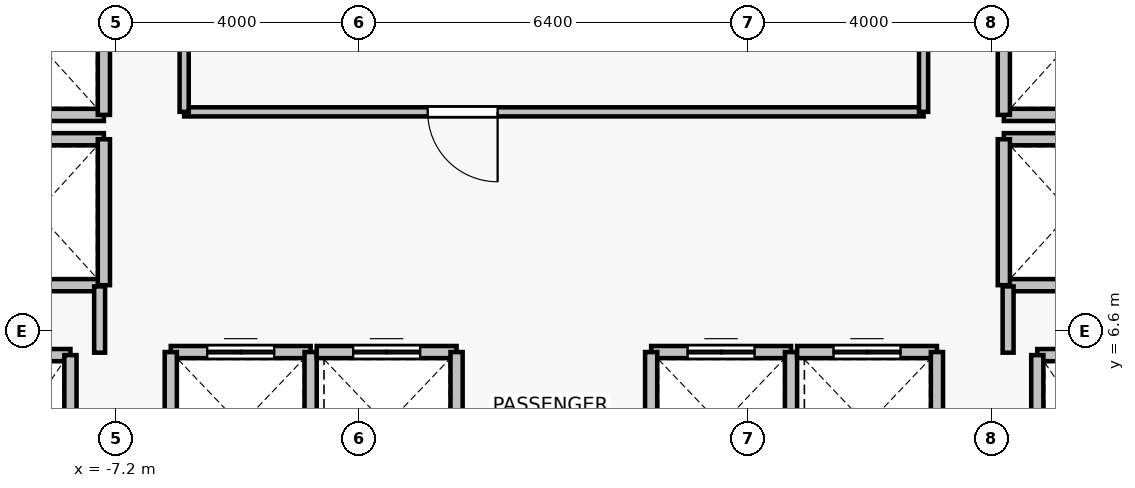
"""IFC4 building model, lengths in metres.
Left out: names, types, materials, properties, quantities, classifications, styles, units other than length and angle.
Written with IfcOpenShell. Run it as: python <this file> out.ifc"""

import sys

from ifc_helpers import new_model, si_unit, direction, frame, frame_2d, origin, place, context, subcontext, project, spatial, rectangle, extrude, source, transform, mapped, element, fill, save


model = new_model("IFC4")
c1 = context("Model", 3, precision=1e-05, world=origin(), true_north=direction((0.0, 1.0)))
c2 = subcontext(c1, "Body", "Model", "MODEL_VIEW")
j1 = project(units=[si_unit("LENGTHUNIT", "METRE"), si_unit("PLANEANGLEUNIT", "RADIAN")], contexts=[c1])
p1 = place(None, origin())
s1 = spatial("IfcSite", under=j1, at=p1, CompositionType="ELEMENT")
p2 = place(p1, origin())
s2 = spatial("IfcBuilding", under=s1, at=p2, CompositionType="ELEMENT")
p3 = place(p2, frame((0.0, 0.0, 106.6)))
s3 = spatial("IfcBuildingStorey", under=s2, at=p3, CompositionType="ELEMENT", Elevation=106.6)
p4 = place(p3, frame((-9.95, 6.2, 0.0), z_axis=(0.0, 0.0, 1.0), x_axis=(1.0, 0.0, 0.0)))
e1 = element("IfcWall", 1, at=p4, inside=s3, PredefinedType="SOLIDWALL", context=c2, shape_type="SweptSolid", body=[
    extrude(rectangle(XDim=2.0, YDim=0.2, at=frame_2d((1.0, 0.0))), origin(), (0.0, 0.0, 1.0), 3.075),
])
p5 = place(p3, frame((-7.95, 6.2, 0.0), z_axis=(0.0, 0.0, 1.0), x_axis=(0.0, -1.0, 0.0)))
e2 = element("IfcWall", 2, at=p5, inside=s3, PredefinedType="SOLIDWALL", context=c2, shape_type="SweptSolid", body=[
    extrude(rectangle(XDim=2.8, YDim=0.2, at=frame_2d((1.4, 0.0))), origin(), (0.0, 0.0, 1.0), 3.075),
])
p6 = place(p3, frame((7.95, 6.2, 0.0), z_axis=(0.0, 0.0, 1.0), x_axis=(1.0, 0.0, 0.0)))
e3 = element("IfcWall", 3, at=p6, inside=s3, PredefinedType="SOLIDWALL", context=c2, shape_type="SweptSolid", body=[
    extrude(rectangle(XDim=2.0, YDim=0.2, at=frame_2d((1.0, 0.0))), origin(), (0.0, 0.0, 1.0), 3.075),
])
p7 = place(p3, frame((7.95, 3.4, 0.0), z_axis=(0.0, 0.0, 1.0), x_axis=(0.0, 1.0, 0.0)))
e4 = element("IfcWall", 4, at=p7, inside=s3, PredefinedType="SOLIDWALL", context=c2, shape_type="SweptSolid", body=[
    extrude(rectangle(XDim=2.8, YDim=0.2, at=frame_2d((1.4, 0.0))), origin(), (0.0, 0.0, 1.0), 3.075),
])
p8 = place(p3, frame((-6.3, 6.25, 0.0), z_axis=(0.0, 0.0, 1.0), x_axis=(1.0, 0.0, 0.0)))
e5 = element("IfcWall", 5, at=p8, inside=s3, PredefinedType="SOLIDWALL", context=c2, shape_type="SweptSolid", body=[
    extrude(rectangle(XDim=2.3, YDim=0.2, at=frame_2d((1.15, 0.0))), origin(), (0.0, 0.0, 1.0), 3.075),
])
p9 = place(p8, frame((0.6, 0.0, 0.0)))
e6 = element("IfcOpeningElement", 6, at=p9, cuts=e5, PredefinedType="OPENING", context=c2, shape_type="SweptSolid", body=[
    extrude(rectangle(XDim=1.1, YDim=2.2, at=frame_2d((0.55, 1.1))), frame((0.0, 0.11, 0.0), z_axis=(0.0, -1.0, 0.0), x_axis=(1.0, 0.0, 0.0)), (0.0, 0.0, 1.0), 0.22),
])
for number, where, z_axis, x_axis in (
    (7, (-6.3, 3.85, 0.0), (0.0, 0.0, 1.0), (0.0, 1.0, 0.0)),
    (8, (-4.0, 6.25, 0.0), (0.0, 0.0, 1.0), (0.0, -1.0, 0.0)),
):
    element("IfcWall", number, at=place(p3, frame(where, z_axis=z_axis, x_axis=x_axis)), inside=s3, PredefinedType="SOLIDWALL", context=c2, shape_type="SweptSolid", body=[
        extrude(rectangle(XDim=2.4, YDim=0.2, at=frame_2d((1.2, 0.0))), origin(), (0.0, 0.0, 1.0), 3.075),
    ])
p10 = place(p3, frame((-3.9, 6.25, 0.0), z_axis=(0.0, 0.0, 1.0), x_axis=(1.0, 0.0, 0.0)))
e9 = element("IfcWall", 9, at=p10, inside=s3, PredefinedType="SOLIDWALL", context=c2, shape_type="SweptSolid", body=[
    extrude(rectangle(XDim=2.3, YDim=0.2, at=frame_2d((1.15, 0.0))), origin(), (0.0, 0.0, 1.0), 3.075),
])
p11 = place(p10, frame((0.6, 0.0, 0.0)))
e10 = element("IfcOpeningElement", 10, at=p11, cuts=e9, PredefinedType="OPENING", context=c2, shape_type="SweptSolid", body=[
    extrude(rectangle(XDim=1.1, YDim=2.2, at=frame_2d((0.55, 1.1))), frame((0.0, 0.11, 0.0), z_axis=(0.0, -1.0, 0.0), x_axis=(1.0, 0.0, 0.0)), (0.0, 0.0, 1.0), 0.22),
])
p12 = place(p3, frame((-1.6, 6.25, 0.0), z_axis=(0.0, 0.0, 1.0), x_axis=(0.0, -1.0, 0.0)))
e11 = element("IfcWall", 11, at=p12, inside=s3, PredefinedType="SOLIDWALL", context=c2, shape_type="SweptSolid", body=[
    extrude(rectangle(XDim=2.4, YDim=0.2, at=frame_2d((1.2, 0.0))), origin(), (0.0, 0.0, 1.0), 3.075),
])
p13 = place(p3, frame((1.6, 6.25, 0.0), z_axis=(0.0, 0.0, 1.0), x_axis=(1.0, 0.0, 0.0)))
e12 = element("IfcWall", 12, at=p13, inside=s3, PredefinedType="SOLIDWALL", context=c2, shape_type="SweptSolid", body=[
    extrude(rectangle(XDim=2.3, YDim=0.2, at=frame_2d((1.15, 0.0))), origin(), (0.0, 0.0, 1.0), 3.075),
])
p14 = place(p13, frame((0.6, 0.0, 0.0)))
e13 = element("IfcOpeningElement", 13, at=p14, cuts=e12, PredefinedType="OPENING", context=c2, shape_type="SweptSolid", body=[
    extrude(rectangle(XDim=1.1, YDim=2.2, at=frame_2d((0.55, 1.1))), frame((0.0, 0.11, 0.0), z_axis=(0.0, -1.0, 0.0), x_axis=(1.0, 0.0, 0.0)), (0.0, 0.0, 1.0), 0.22),
])
for number, where, z_axis, x_axis in (
    (14, (1.6, 3.85, 0.0), (0.0, 0.0, 1.0), (0.0, 1.0, 0.0)),
    (15, (3.9, 6.25, 0.0), (0.0, 0.0, 1.0), (0.0, -1.0, 0.0)),
):
    element("IfcWall", number, at=place(p3, frame(where, z_axis=z_axis, x_axis=x_axis)), inside=s3, PredefinedType="SOLIDWALL", context=c2, shape_type="SweptSolid", body=[
        extrude(rectangle(XDim=2.4, YDim=0.2, at=frame_2d((1.2, 0.0))), origin(), (0.0, 0.0, 1.0), 3.075),
    ])
p15 = place(p3, frame((4.0, 6.25, 0.0), z_axis=(0.0, 0.0, 1.0), x_axis=(1.0, 0.0, 0.0)))
e16 = element("IfcWall", 16, at=p15, inside=s3, PredefinedType="SOLIDWALL", context=c2, shape_type="SweptSolid", body=[
    extrude(rectangle(XDim=2.3, YDim=0.2, at=frame_2d((1.15, 0.0))), origin(), (0.0, 0.0, 1.0), 3.075),
])
p16 = place(p15, frame((0.6, 0.0, 0.0)))
e17 = element("IfcOpeningElement", 17, at=p16, cuts=e16, PredefinedType="OPENING", context=c2, shape_type="SweptSolid", body=[
    extrude(rectangle(XDim=1.1, YDim=2.2, at=frame_2d((0.55, 1.1))), frame((0.0, 0.11, 0.0), z_axis=(0.0, -1.0, 0.0), x_axis=(1.0, 0.0, 0.0)), (0.0, 0.0, 1.0), 0.22),
])
p17 = place(p3, frame((6.3, 6.25, 0.0), z_axis=(0.0, 0.0, 1.0), x_axis=(0.0, -1.0, 0.0)))
e18 = element("IfcWall", 18, at=p17, inside=s3, PredefinedType="SOLIDWALL", context=c2, shape_type="SweptSolid", body=[
    extrude(rectangle(XDim=2.4, YDim=0.2, at=frame_2d((1.2, 0.0))), origin(), (0.0, 0.0, 1.0), 3.075),
])
for number, where, z_axis, x_axis in (
    (19, (-7.4, 7.35, 0.0), (0.0, 0.0, 1.0), (-1.0, 0.0, 0.0)),
    (20, (-9.6, 9.75, 0.0), (0.0, 0.0, 1.0), (1.0, 0.0, 0.0)),
):
    element("IfcWall", number, at=place(p3, frame(where, z_axis=z_axis, x_axis=x_axis)), inside=s3, PredefinedType="SOLIDWALL", context=c2, shape_type="SweptSolid", body=[
        extrude(rectangle(XDim=2.2, YDim=0.2, at=frame_2d((1.1, 0.0))), origin(), (0.0, 0.0, 1.0), 2.515),
    ])
p18 = place(p3, frame((-7.4, 9.75, 0.0), z_axis=(0.0, 0.0, 1.0), x_axis=(0.0, -1.0, 0.0)))
e21 = element("IfcWall", 21, at=p18, inside=s3, PredefinedType="SOLIDWALL", context=c2, shape_type="SweptSolid", body=[
    extrude(rectangle(XDim=2.4, YDim=0.2, at=frame_2d((1.2, 0.0))), origin(), (0.0, 0.0, 1.0), 2.515),
])
p19 = place(p3, frame((-7.4, 10.15, 0.0), z_axis=(0.0, 0.0, 1.0), x_axis=(-1.0, 0.0, 0.0)))
e22 = element("IfcWall", 22, at=p19, inside=s3, PredefinedType="SOLIDWALL", context=c2, shape_type="SweptSolid", body=[
    extrude(rectangle(XDim=2.2, YDim=0.2, at=frame_2d((1.1, 0.0))), origin(), (0.0, 0.0, 1.0), 2.515),
])
p20 = place(p3, frame((-7.4, 12.55, 0.0), z_axis=(0.0, 0.0, 1.0), x_axis=(0.0, -1.0, 0.0)))
e23 = element("IfcWall", 23, at=p20, inside=s3, PredefinedType="SOLIDWALL", context=c2, shape_type="SweptSolid", body=[
    extrude(rectangle(XDim=2.4, YDim=0.2, at=frame_2d((1.2, 0.0))), origin(), (0.0, 0.0, 1.0), 2.515),
])
for number, where, z_axis, x_axis in (
    (24, (9.6, 7.35, 0.0), (0.0, 0.0, 1.0), (-1.0, 0.0, 0.0)),
    (25, (7.4, 9.75, 0.0), (0.0, 0.0, 1.0), (1.0, 0.0, 0.0)),
):
    element("IfcWall", number, at=place(p3, frame(where, z_axis=z_axis, x_axis=x_axis)), inside=s3, PredefinedType="SOLIDWALL", context=c2, shape_type="SweptSolid", body=[
        extrude(rectangle(XDim=2.2, YDim=0.2, at=frame_2d((1.1, 0.0))), origin(), (0.0, 0.0, 1.0), 2.515),
    ])
p21 = place(p3, frame((7.4, 7.35, 0.0), z_axis=(0.0, 0.0, 1.0), x_axis=(0.0, 1.0, 0.0)))
e26 = element("IfcWall", 26, at=p21, inside=s3, PredefinedType="SOLIDWALL", context=c2, shape_type="SweptSolid", body=[
    extrude(rectangle(XDim=2.4, YDim=0.2, at=frame_2d((1.2, 0.0))), origin(), (0.0, 0.0, 1.0), 2.515),
])
p22 = place(p3, frame((9.6, 10.15, 0.0), z_axis=(0.0, 0.0, 1.0), x_axis=(-1.0, 0.0, 0.0)))
e27 = element("IfcWall", 27, at=p22, inside=s3, PredefinedType="SOLIDWALL", context=c2, shape_type="SweptSolid", body=[
    extrude(rectangle(XDim=2.2, YDim=0.2, at=frame_2d((1.1, 0.0))), origin(), (0.0, 0.0, 1.0), 2.515),
])
p23 = place(p3, frame((7.4, 10.15, 0.0), z_axis=(0.0, 0.0, 1.0), x_axis=(0.0, 1.0, 0.0)))
e28 = element("IfcWall", 28, at=p23, inside=s3, PredefinedType="SOLIDWALL", context=c2, shape_type="SweptSolid", body=[
    extrude(rectangle(XDim=2.4, YDim=0.2, at=frame_2d((1.2, 0.0))), origin(), (0.0, 0.0, 1.0), 2.515),
])
for number, where, z_axis, x_axis in (
    (29, (-7.47, 7.33, 0.0), (0.0, 0.0, 1.0), (0.0, -1.0, 0.0)),
    (30, (7.47, 6.24, 0.0), (0.0, 0.0, 1.0), (0.0, 1.0, 0.0)),
):
    element("IfcWall", number, at=place(p3, frame(where, z_axis=z_axis, x_axis=x_axis)), inside=s3, PredefinedType="PARTITIONING", context=c2, shape_type="SweptSolid", body=[
        extrude(rectangle(XDim=1.09, YDim=0.18, at=frame_2d((0.545, 0.0))), origin(), (0.0, 0.0, 1.0), 2.515),
    ])
p24 = place(p3, frame((6.08, 10.2, 0.0), z_axis=(0.0, 0.0, 1.0), x_axis=(-1.0, 0.0, 0.0)))
e31 = element("IfcWall", 31, at=p24, inside=s3, PredefinedType="PARTITIONING", context=c2, shape_type="SweptSolid", body=[
    extrude(rectangle(XDim=12.16, YDim=0.15, at=frame_2d((6.08, 0.0))), origin(), (0.0, 0.0, 1.0), 3.075),
])
p25 = place(p24, frame((7.005, 0.0, 0.0)))
e32 = element("IfcOpeningElement", 32, at=p25, cuts=e31, PredefinedType="OPENING", context=c2, shape_type="SweptSolid", body=[
    extrude(rectangle(XDim=1.15, YDim=2.15, at=frame_2d((0.575, 1.075))), frame((0.0, 0.085, 0.0), z_axis=(0.0, -1.0, 0.0), x_axis=(1.0, 0.0, 0.0)), (0.0, 0.0, 1.0), 0.17),
])
for number, where, z_axis, x_axis in (
    (33, (-6.08, 10.2, 0.0), (0.0, 0.0, 1.0), (0.0, 1.0, 0.0)),
    (34, (6.08, 13.0, 0.0), (0.0, 0.0, 1.0), (0.0, -1.0, 0.0)),
):
    element("IfcWall", number, at=place(p3, frame(where, z_axis=z_axis, x_axis=x_axis)), inside=s3, PredefinedType="PARTITIONING", context=c2, shape_type="SweptSolid", body=[
        extrude(rectangle(XDim=2.8, YDim=0.15, at=frame_2d((1.4, 0.0))), origin(), (0.0, 0.0, 1.0), 3.075),
    ])
m1 = source(origin(), c2, "Body", "SweptSolid", [
    extrude(rectangle(XDim=1.1, YDim=2.2, at=frame_2d((0.55, 1.1))), frame((0.0, 0.025, 0.0), z_axis=(0.0, -1.0, 0.0), x_axis=(1.0, 0.0, 0.0)), (0.0, 0.0, 1.0), 0.05),
])
p26 = place(p9, origin())
e35 = element("IfcDoor", 35, at=p26, inside=s3, OperationType="DOUBLE_DOOR_SLIDING", PredefinedType="DOOR", context=c2, shape_type="MappedRepresentation", body=[
    mapped(m1, transform((0.0, 0.0, 0.0), x_axis=(1.0, 0.0, 0.0), y_axis=(0.0, 1.0, 0.0), z_axis=(0.0, 0.0, 1.0), scale=1.0)),
])
fill(e6, e35)
p27 = place(p11, origin())
e36 = element("IfcDoor", 36, at=p27, inside=s3, OperationType="DOUBLE_DOOR_SLIDING", PredefinedType="DOOR", context=c2, shape_type="MappedRepresentation", body=[
    mapped(m1, transform((0.0, 0.0, 0.0), x_axis=(1.0, 0.0, 0.0), y_axis=(0.0, 1.0, 0.0), z_axis=(0.0, 0.0, 1.0), scale=1.0)),
])
fill(e10, e36)
p28 = place(p14, origin())
e37 = element("IfcDoor", 37, at=p28, inside=s3, OperationType="DOUBLE_DOOR_SLIDING", PredefinedType="DOOR", context=c2, shape_type="MappedRepresentation", body=[
    mapped(m1, transform((0.0, 0.0, 0.0), x_axis=(1.0, 0.0, 0.0), y_axis=(0.0, 1.0, 0.0), z_axis=(0.0, 0.0, 1.0), scale=1.0)),
])
fill(e13, e37)
p29 = place(p16, origin())
e38 = element("IfcDoor", 38, at=p29, inside=s3, OperationType="DOUBLE_DOOR_SLIDING", PredefinedType="DOOR", context=c2, shape_type="MappedRepresentation", body=[
    mapped(m1, transform((0.0, 0.0, 0.0), x_axis=(1.0, 0.0, 0.0), y_axis=(0.0, 1.0, 0.0), z_axis=(0.0, 0.0, 1.0), scale=1.0)),
])
fill(e17, e38)
m2 = source(origin(), c2, "Body", "SweptSolid", [
    extrude(rectangle(XDim=1.15, YDim=2.15, at=frame_2d((0.575, 1.075))), frame((0.0, 0.025, 0.0), z_axis=(0.0, -1.0, 0.0), x_axis=(1.0, 0.0, 0.0)), (0.0, 0.0, 1.0), 0.05),
])
p30 = place(p25, origin())
e39 = element("IfcDoor", 39, at=p30, inside=s3, OperationType="SINGLE_SWING_LEFT", PredefinedType="DOOR", context=c2, shape_type="MappedRepresentation", body=[
    mapped(m2, transform((0.0, 0.0, 0.0), x_axis=(1.0, 0.0, 0.0), y_axis=(0.0, 1.0, 0.0), z_axis=(0.0, 0.0, 1.0), scale=1.0)),
])
fill(e32, e39)
save(model, sys.argv[1])
